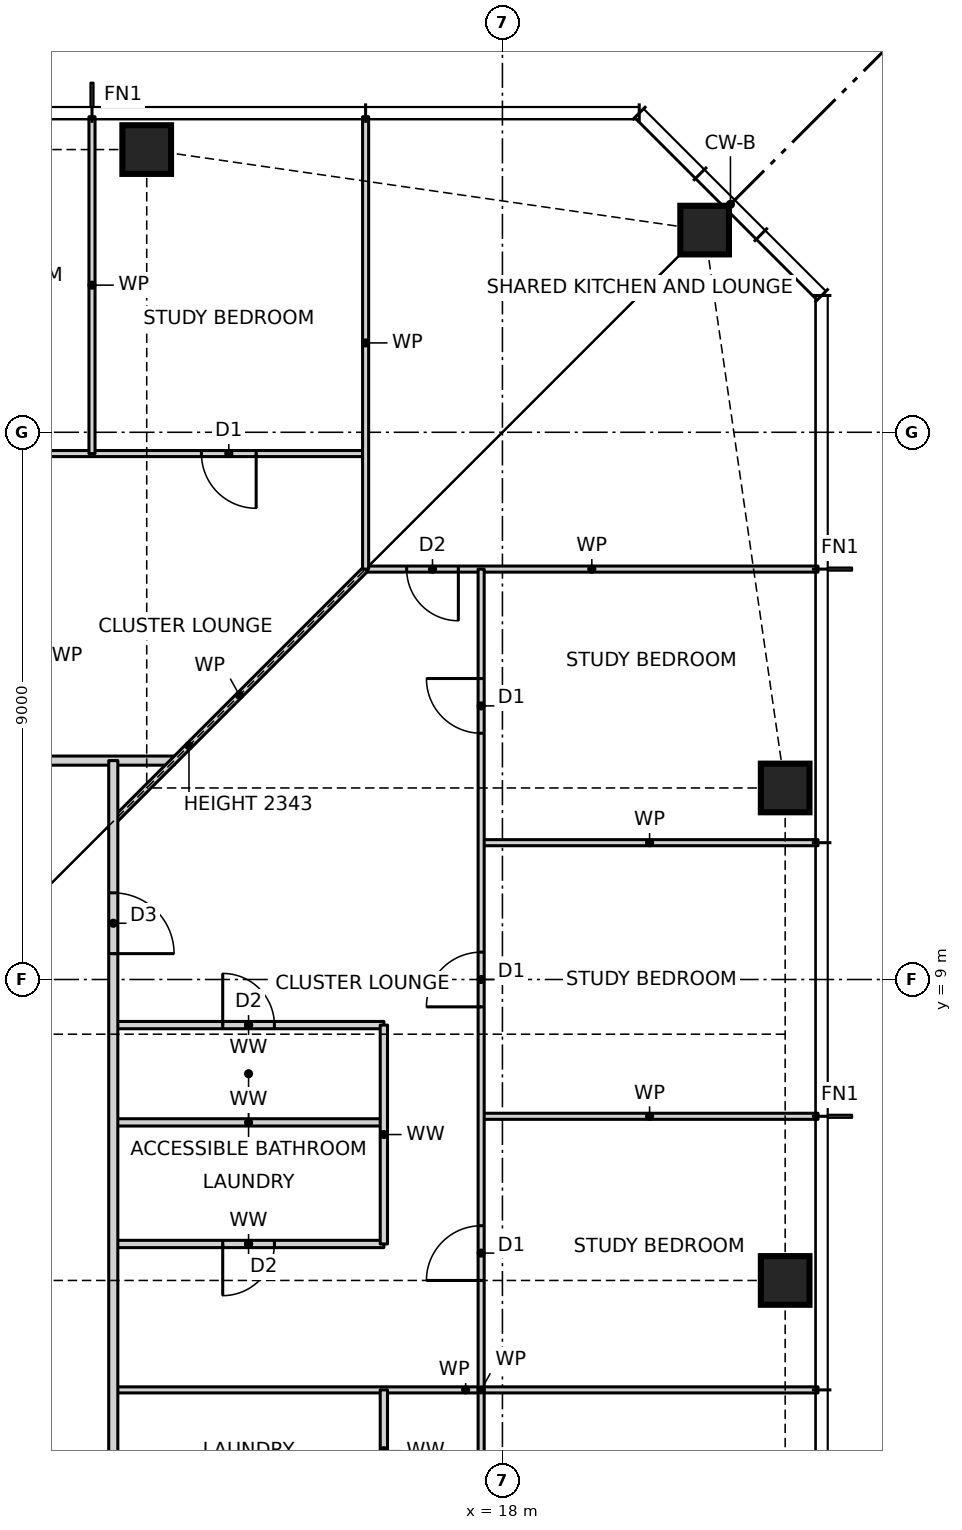
"""IFC4 building model, lengths in metres.
Left out: names, types, materials, properties, quantities, classifications, styles, units other than length and angle.
Written with IfcOpenShell. Run it as: python <this file> out.ifc"""

import sys

from ifc_helpers import new_model, si_unit, direction, frame, frame_2d, origin, origin_2d, place, context, subcontext, project, spatial, rectangle, hollow_rectangle, extrude, element, fill, save


model = new_model("IFC4")
c1 = context("Model", 3, precision=1e-05, world=origin(), true_north=direction((0.0, 1.0)))
c2 = subcontext(c1, "Body", "Model", "MODEL_VIEW")
j1 = project(units=[si_unit("LENGTHUNIT", "METRE"), si_unit("PLANEANGLEUNIT", "RADIAN")], contexts=[c1])
p1 = place(None, origin())
s1 = spatial("IfcSite", under=j1, at=p1, CompositionType="ELEMENT")
p2 = place(p1, origin())
s2 = spatial("IfcBuilding", under=s1, at=p2, CompositionType="ELEMENT")
p3 = place(p2, frame((0.0, 0.0, 36.0)))
s3 = spatial("IfcBuildingStorey", under=s2, at=p3, CompositionType="ELEMENT", Elevation=36.0)
for number, where, z_axis, x_axis in (
    (1, (22.65, 4.05, 0.0), (0.0, 0.0, 1.0), (1.0, 0.0, 0.0)),
    (2, (22.65, 12.15, 0.0), (0.0, 0.0, 1.0), (1.0, 0.0, 0.0)),
    (3, (21.326, 21.326, 0.0), (0.0, 0.0, 1.0), (1.0, 0.0, 0.0)),
    (4, (12.15, 22.65, 0.0), (0.0, 0.0, 1.0), (1.0, 0.0, 0.0)),
):
    element("IfcColumn", number, at=place(p3, frame(where, z_axis=z_axis, x_axis=x_axis)), inside=s3, PredefinedType="COLUMN", context=c2, shape_type="SweptSolid", body=[
        extrude(hollow_rectangle(XDim=0.8, YDim=0.8, WallThickness=0.09, at=origin_2d()), origin(), (0.0, 0.0, 1.0), 3.5),
    ])
p4 = place(p3, frame((11.6, 2.25, 0.0), z_axis=(0.0, 0.0, 1.0), x_axis=(1.0, 0.0, 0.0)))
e5 = element("IfcWall", 5, at=p4, inside=s3, PredefinedType="PARTITIONING", context=c2, shape_type="SweptSolid", body=[
    extrude(rectangle(XDim=11.59, YDim=0.1, at=frame_2d((5.795, 0.0))), origin(), (0.0, 0.0, 1.0), 3.27),
])
p5 = place(p3, frame((11.6, 4.65, 0.0), z_axis=(0.0, 0.0, 1.0), x_axis=(1.0, 0.0, 0.0)))
e6 = element("IfcWall", 6, at=p5, inside=s3, PredefinedType="PARTITIONING", context=c2, shape_type="SweptSolid", body=[
    extrude(rectangle(XDim=4.45, YDim=0.12, at=frame_2d((2.225, 0.0))), origin(), (0.0, 0.0, 1.0), 3.27),
])
p6 = place(p5, frame((1.8, 0.0, 0.0)))
e7 = element("IfcOpeningElement", 7, at=p6, cuts=e6, PredefinedType="OPENING", context=c2, shape_type="SweptSolid", body=[
    extrude(rectangle(XDim=0.85, YDim=2.1, at=frame_2d((0.425, 1.05))), frame((0.0, 0.07, 0.0), z_axis=(0.0, -1.0, 0.0), x_axis=(1.0, 0.0, 0.0)), (0.0, 0.0, 1.0), 0.14),
])
p7 = place(p3, frame((11.6, 6.65, 0.0), z_axis=(0.0, 0.0, 1.0), x_axis=(1.0, 0.0, 0.0)))
e8 = element("IfcWall", 8, at=p7, inside=s3, PredefinedType="PARTITIONING", context=c2, shape_type="SweptSolid", body=[
    extrude(rectangle(XDim=4.45, YDim=0.12, at=frame_2d((2.225, 0.0))), origin(), (0.0, 0.0, 1.0), 3.27),
])
p8 = place(p3, frame((17.65, 6.75, 0.0), z_axis=(0.0, 0.0, 1.0), x_axis=(1.0, 0.0, 0.0)))
e9 = element("IfcWall", 9, at=p8, inside=s3, PredefinedType="PARTITIONING", context=c2, shape_type="SweptSolid", body=[
    extrude(rectangle(XDim=5.54, YDim=0.1, at=frame_2d((2.77, 0.0))), origin(), (0.0, 0.0, 1.0), 3.27),
])
p9 = place(p3, frame((11.6, 8.25, 0.0), z_axis=(0.0, 0.0, 1.0), x_axis=(1.0, 0.0, 0.0)))
e10 = element("IfcWall", 10, at=p9, inside=s3, PredefinedType="PARTITIONING", context=c2, shape_type="SweptSolid", body=[
    extrude(rectangle(XDim=4.45, YDim=0.12, at=frame_2d((2.225, 0.0))), origin(), (0.0, 0.0, 1.0), 3.27),
])
p10 = place(p9, frame((1.8, 0.0, 0.0)))
e11 = element("IfcOpeningElement", 11, at=p10, cuts=e10, PredefinedType="OPENING", context=c2, shape_type="SweptSolid", body=[
    extrude(rectangle(XDim=0.85, YDim=2.1, at=frame_2d((0.425, 1.05))), frame((0.0, 0.07, 0.0), z_axis=(0.0, -1.0, 0.0), x_axis=(1.0, 0.0, 0.0)), (0.0, 0.0, 1.0), 0.14),
])
p11 = place(p3, frame((17.65, 11.25, 0.0), z_axis=(0.0, 0.0, 1.0), x_axis=(1.0, 0.0, 0.0)))
e12 = element("IfcWall", 12, at=p11, inside=s3, PredefinedType="PARTITIONING", context=c2, shape_type="SweptSolid", body=[
    extrude(rectangle(XDim=5.54, YDim=0.1, at=frame_2d((2.77, 0.0))), origin(), (0.0, 0.0, 1.0), 3.27),
])
p12 = place(p3, frame((-12.6, 12.6, 0.0), z_axis=(0.0, 0.0, 1.0), x_axis=(1.0, 0.0, 0.0)))
e13 = element("IfcWall", 13, at=p12, inside=s3, PredefinedType="PARTITIONING", context=c2, shape_type="SweptSolid", body=[
    extrude(rectangle(XDim=25.2, YDim=0.15, at=frame_2d((12.6, 0.0))), origin(), (0.0, 0.0, 1.0), 3.27),
])
p13 = place(p12, frame((3.15, 0.0, 0.0)))
e14 = element("IfcOpeningElement", 14, at=p13, cuts=e13, PredefinedType="OPENING", context=c2, shape_type="SweptSolid", body=[
    extrude(rectangle(XDim=1.0, YDim=2.1, at=frame_2d((0.5, 1.05))), frame((0.0, 0.085, 0.0), z_axis=(0.0, -1.0, 0.0), x_axis=(1.0, 0.0, 0.0)), (0.0, 0.0, 1.0), 0.17),
])
p14 = place(p3, frame((15.75, 15.75, 0.0), z_axis=(0.0, 0.0, 1.0), x_axis=(1.0, 0.0, 0.0)))
e15 = element("IfcWall", 15, at=p14, inside=s3, PredefinedType="PARTITIONING", context=c2, shape_type="SweptSolid", body=[
    extrude(rectangle(XDim=7.44, YDim=0.1, at=frame_2d((3.72, 0.0))), origin(), (0.0, 0.0, 1.0), 3.27),
])
p15 = place(p14, frame((0.675, 0.0, 0.0)))
e16 = element("IfcOpeningElement", 16, at=p15, cuts=e15, PredefinedType="OPENING", context=c2, shape_type="SweptSolid", body=[
    extrude(rectangle(XDim=0.85, YDim=2.1, at=frame_2d((0.425, 1.05))), frame((0.0, 0.06, 0.0), z_axis=(0.0, -1.0, 0.0), x_axis=(1.0, 0.0, 0.0)), (0.0, 0.0, 1.0), 0.12),
])
p16 = place(p3, frame((-15.75, 17.65, 0.0), z_axis=(0.0, 0.0, 1.0), x_axis=(1.0, 0.0, 0.0)))
e17 = element("IfcWall", 17, at=p16, inside=s3, PredefinedType="PARTITIONING", context=c2, shape_type="SweptSolid", body=[
    extrude(rectangle(XDim=31.5, YDim=0.1, at=frame_2d((15.75, 0.0))), origin(), (0.0, 0.0, 1.0), 3.27),
])
p17 = place(p16, frame((28.8, 0.0, 0.0)))
e18 = element("IfcOpeningElement", 18, at=p17, cuts=e17, PredefinedType="OPENING", context=c2, shape_type="SweptSolid", body=[
    extrude(rectangle(XDim=0.9, YDim=2.1, at=frame_2d((0.45, 1.05))), frame((0.0, 0.06, 0.0), z_axis=(0.0, -1.0, 0.0), x_axis=(1.0, 0.0, 0.0)), (0.0, 0.0, 1.0), 0.12),
])
p18 = place(p16, frame((24.3, 0.0, 0.0)))
e19 = element("IfcOpeningElement", 19, at=p18, cuts=e17, PredefinedType="OPENING", context=c2, shape_type="SweptSolid", body=[
    extrude(rectangle(XDim=0.9, YDim=2.1, at=frame_2d((0.45, 1.05))), frame((0.0, 0.06, 0.0), z_axis=(0.0, -1.0, 0.0), x_axis=(1.0, 0.0, 0.0)), (0.0, 0.0, 1.0), 0.12),
])
p19 = place(p16, frame((19.8, 0.0, 0.0)))
e20 = element("IfcOpeningElement", 20, at=p19, cuts=e17, PredefinedType="OPENING", context=c2, shape_type="SweptSolid", body=[
    extrude(rectangle(XDim=0.9, YDim=2.1, at=frame_2d((0.45, 1.05))), frame((0.0, 0.06, 0.0), z_axis=(0.0, -1.0, 0.0), x_axis=(1.0, 0.0, 0.0)), (0.0, 0.0, 1.0), 0.12),
])
p20 = place(p16, frame((15.3, 0.0, 0.0)))
e21 = element("IfcOpeningElement", 21, at=p20, cuts=e17, PredefinedType="OPENING", context=c2, shape_type="SweptSolid", body=[
    extrude(rectangle(XDim=0.9, YDim=2.1, at=frame_2d((0.45, 1.05))), frame((0.0, 0.06, 0.0), z_axis=(0.0, -1.0, 0.0), x_axis=(1.0, 0.0, 0.0)), (0.0, 0.0, 1.0), 0.12),
])
p21 = place(p16, frame((10.8, 0.0, 0.0)))
e22 = element("IfcOpeningElement", 22, at=p21, cuts=e17, PredefinedType="OPENING", context=c2, shape_type="SweptSolid", body=[
    extrude(rectangle(XDim=0.9, YDim=2.1, at=frame_2d((0.45, 1.05))), frame((0.0, 0.06, 0.0), z_axis=(0.0, -1.0, 0.0), x_axis=(1.0, 0.0, 0.0)), (0.0, 0.0, 1.0), 0.12),
])
p22 = place(p16, frame((6.3, 0.0, 0.0)))
e23 = element("IfcOpeningElement", 23, at=p22, cuts=e17, PredefinedType="OPENING", context=c2, shape_type="SweptSolid", body=[
    extrude(rectangle(XDim=0.9, YDim=2.1, at=frame_2d((0.45, 1.05))), frame((0.0, 0.06, 0.0), z_axis=(0.0, -1.0, 0.0), x_axis=(1.0, 0.0, 0.0)), (0.0, 0.0, 1.0), 0.12),
])
p23 = place(p16, frame((1.8, 0.0, 0.0)))
e24 = element("IfcOpeningElement", 24, at=p23, cuts=e17, PredefinedType="OPENING", context=c2, shape_type="SweptSolid", body=[
    extrude(rectangle(XDim=0.9, YDim=2.1, at=frame_2d((0.45, 1.05))), frame((0.0, 0.06, 0.0), z_axis=(0.0, -1.0, 0.0), x_axis=(1.0, 0.0, 0.0)), (0.0, 0.0, 1.0), 0.12),
])
p24 = place(p3, frame((11.6, 11.6, 0.0), z_axis=(0.0, 0.0, 1.0), x_axis=(0.707106781187, 0.707106781187, 0.0)))
e25 = element("IfcWall", 25, at=p24, inside=s3, PredefinedType="PARTITIONING", context=c2, shape_type="SweptSolid", body=[
    extrude(rectangle(XDim=5.869, YDim=0.1, at=frame_2d((2.935, 0.0))), origin(), (0.0, 0.0, 1.0), 2.343),
])
p25 = place(p3, frame((17.65, -11.25, 0.0), z_axis=(0.0, 0.0, 1.0), x_axis=(0.0, 1.0, 0.0)))
e26 = element("IfcWall", 26, at=p25, inside=s3, PredefinedType="PARTITIONING", context=c2, shape_type="SweptSolid", body=[
    extrude(rectangle(XDim=27.0, YDim=0.1, at=frame_2d((13.5, 0.0))), origin(), (0.0, 0.0, 1.0), 3.0),
])
p26 = place(p25, frame((1.8, 0.0, 0.0)))
e27 = element("IfcOpeningElement", 27, at=p26, cuts=e26, PredefinedType="OPENING", context=c2, shape_type="SweptSolid", body=[
    extrude(rectangle(XDim=0.9, YDim=2.1, at=frame_2d((0.45, 1.05))), frame((0.0, 0.06, 0.0), z_axis=(0.0, -1.0, 0.0), x_axis=(1.0, 0.0, 0.0)), (0.0, 0.0, 1.0), 0.12),
])
p27 = place(p25, frame((6.3, 0.0, 0.0)))
e28 = element("IfcOpeningElement", 28, at=p27, cuts=e26, PredefinedType="OPENING", context=c2, shape_type="SweptSolid", body=[
    extrude(rectangle(XDim=0.9, YDim=2.1, at=frame_2d((0.45, 1.05))), frame((0.0, 0.06, 0.0), z_axis=(0.0, -1.0, 0.0), x_axis=(1.0, 0.0, 0.0)), (0.0, 0.0, 1.0), 0.12),
])
p28 = place(p25, frame((10.8, 0.0, 0.0)))
e29 = element("IfcOpeningElement", 29, at=p28, cuts=e26, PredefinedType="OPENING", context=c2, shape_type="SweptSolid", body=[
    extrude(rectangle(XDim=0.9, YDim=2.1, at=frame_2d((0.45, 1.05))), frame((0.0, 0.06, 0.0), z_axis=(0.0, -1.0, 0.0), x_axis=(1.0, 0.0, 0.0)), (0.0, 0.0, 1.0), 0.12),
])
p29 = place(p25, frame((15.3, 0.0, 0.0)))
e30 = element("IfcOpeningElement", 30, at=p29, cuts=e26, PredefinedType="OPENING", context=c2, shape_type="SweptSolid", body=[
    extrude(rectangle(XDim=0.9, YDim=2.1, at=frame_2d((0.45, 1.05))), frame((0.0, 0.06, 0.0), z_axis=(0.0, -1.0, 0.0), x_axis=(1.0, 0.0, 0.0)), (0.0, 0.0, 1.0), 0.12),
])
p30 = place(p25, frame((19.8, 0.0, 0.0)))
e31 = element("IfcOpeningElement", 31, at=p30, cuts=e26, PredefinedType="OPENING", context=c2, shape_type="SweptSolid", body=[
    extrude(rectangle(XDim=0.9, YDim=2.1, at=frame_2d((0.45, 1.05))), frame((0.0, 0.06, 0.0), z_axis=(0.0, -1.0, 0.0), x_axis=(1.0, 0.0, 0.0)), (0.0, 0.0, 1.0), 0.12),
])
p31 = place(p25, frame((24.3, 0.0, 0.0)))
e32 = element("IfcOpeningElement", 32, at=p31, cuts=e26, PredefinedType="OPENING", context=c2, shape_type="SweptSolid", body=[
    extrude(rectangle(XDim=0.9, YDim=2.1, at=frame_2d((0.45, 1.05))), frame((0.0, 0.06, 0.0), z_axis=(0.0, -1.0, 0.0), x_axis=(1.0, 0.0, 0.0)), (0.0, 0.0, 1.0), 0.12),
])
p32 = place(p3, frame((16.05, 0.25, 0.0), z_axis=(0.0, 0.0, 1.0), x_axis=(0.0, 1.0, 0.0)))
e33 = element("IfcWall", 33, at=p32, inside=s3, PredefinedType="PARTITIONING", context=c2, shape_type="SweptSolid", body=[
    extrude(rectangle(XDim=2.0, YDim=0.12, at=frame_2d((1.0, 0.0))), origin(), (0.0, 0.0, 1.0), 3.27),
])
p33 = place(p3, frame((16.05, 4.65, 0.0), z_axis=(0.0, 0.0, 1.0), x_axis=(0.0, 1.0, 0.0)))
e34 = element("IfcWall", 34, at=p33, inside=s3, PredefinedType="PARTITIONING", context=c2, shape_type="SweptSolid", body=[
    extrude(rectangle(XDim=3.6, YDim=0.12, at=frame_2d((1.8, 0.0))), origin(), (0.0, 0.0, 1.0), 3.27),
])
p34 = place(p3, frame((15.75, 15.75, 0.0), z_axis=(0.0, 0.0, 1.0), x_axis=(0.0, 1.0, 0.0)))
e35 = element("IfcWall", 35, at=p34, inside=s3, PredefinedType="PARTITIONING", context=c2, shape_type="SweptSolid", body=[
    extrude(rectangle(XDim=7.44, YDim=0.1, at=frame_2d((3.72, 0.0))), origin(), (0.0, 0.0, 1.0), 3.27),
])
p35 = place(p3, frame((11.6, -11.6, 0.0), z_axis=(0.0, 0.0, 1.0), x_axis=(0.0, 1.0, 0.0)))
e36 = element("IfcWall", 36, at=p35, inside=s3, PredefinedType="PARTITIONING", context=c2, shape_type="SweptSolid", body=[
    extrude(rectangle(XDim=24.2, YDim=0.15, at=frame_2d((12.1, 0.0))), origin(), (0.0, 0.0, 1.0), 3.27),
])
p36 = place(p35, frame((3.6, 0.0, 0.0)))
e37 = element("IfcOpeningElement", 37, at=p36, cuts=e36, PredefinedType="OPENING", context=c2, shape_type="SweptSolid", body=[
    extrude(rectangle(XDim=1.0, YDim=2.1, at=frame_2d((0.5, 1.05))), frame((0.0, 0.085, 0.0), z_axis=(0.0, -1.0, 0.0), x_axis=(1.0, 0.0, 0.0)), (0.0, 0.0, 1.0), 0.17),
])
p37 = place(p35, frame((21.025, 0.0, 0.0)))
e38 = element("IfcOpeningElement", 38, at=p37, cuts=e36, PredefinedType="OPENING", context=c2, shape_type="SweptSolid", body=[
    extrude(rectangle(XDim=1.0, YDim=2.1, at=frame_2d((0.5, 1.05))), frame((0.0, 0.085, 0.0), z_axis=(0.0, -1.0, 0.0), x_axis=(1.0, 0.0, 0.0)), (0.0, 0.0, 1.0), 0.17),
])
p38 = place(p3, frame((11.25, 17.65, 0.0), z_axis=(0.0, 0.0, 1.0), x_axis=(0.0, 1.0, 0.0)))
e39 = element("IfcWall", 39, at=p38, inside=s3, PredefinedType="PARTITIONING", context=c2, shape_type="SweptSolid", body=[
    extrude(rectangle(XDim=5.54, YDim=0.1, at=frame_2d((2.77, 0.0))), origin(), (0.0, 0.0, 1.0), 3.27),
])
p39 = place(p29, origin())
e40 = element("IfcDoor", 40, at=p39, inside=s3, OperationType="SINGLE_SWING_LEFT", PredefinedType="DOOR", context=c2, shape_type="SweptSolid", body=[
    extrude(rectangle(XDim=0.9, YDim=2.1, at=frame_2d((0.45, 1.05))), frame((0.0, 0.025, 0.0), z_axis=(0.0, -1.0, 0.0), x_axis=(1.0, 0.0, 0.0)), (0.0, 0.0, 1.0), 0.05),
])
fill(e30, e40)
p40 = place(p30, origin())
e41 = element("IfcDoor", 41, at=p40, inside=s3, OperationType="SINGLE_SWING_LEFT", PredefinedType="DOOR", context=c2, shape_type="SweptSolid", body=[
    extrude(rectangle(XDim=0.9, YDim=2.1, at=frame_2d((0.45, 1.05))), frame((0.0, 0.025, 0.0), z_axis=(0.0, -1.0, 0.0), x_axis=(1.0, 0.0, 0.0)), (0.0, 0.0, 1.0), 0.05),
])
fill(e31, e41)
p41 = place(p31, origin())
e42 = element("IfcDoor", 42, at=p41, inside=s3, OperationType="SINGLE_SWING_RIGHT", PredefinedType="DOOR", context=c2, shape_type="SweptSolid", body=[
    extrude(rectangle(XDim=0.9, YDim=2.1, at=frame_2d((0.45, 1.05))), frame((0.0, 0.025, 0.0), z_axis=(0.0, -1.0, 0.0), x_axis=(1.0, 0.0, 0.0)), (0.0, 0.0, 1.0), 0.05),
])
fill(e32, e42)
p42 = place(p37, frame((1.0, 0.0, 0.0), z_axis=(0.0, 0.0, 1.0), x_axis=(-1.0, 0.0, 0.0)))
e43 = element("IfcDoor", 43, at=p42, inside=s3, OperationType="SINGLE_SWING_RIGHT", PredefinedType="DOOR", context=c2, shape_type="SweptSolid", body=[
    extrude(rectangle(XDim=1.0, YDim=2.1, at=frame_2d((0.5, 1.05))), frame((0.0, 0.025, 0.0), z_axis=(0.0, -1.0, 0.0), x_axis=(1.0, 0.0, 0.0)), (0.0, 0.0, 1.0), 0.05),
])
fill(e38, e43)
p43 = place(p6, frame((0.85, 0.0, 0.0), z_axis=(0.0, 0.0, 1.0), x_axis=(-1.0, 0.0, 0.0)))
e44 = element("IfcDoor", 44, at=p43, inside=s3, OperationType="SINGLE_SWING_RIGHT", PredefinedType="DOOR", context=c2, shape_type="SweptSolid", body=[
    extrude(rectangle(XDim=0.85, YDim=2.1, at=frame_2d((0.425, 1.05))), frame((0.0, 0.025, 0.0), z_axis=(0.0, -1.0, 0.0), x_axis=(1.0, 0.0, 0.0)), (0.0, 0.0, 1.0), 0.05),
])
fill(e7, e44)
p44 = place(p10, origin())
e45 = element("IfcDoor", 45, at=p44, inside=s3, OperationType="SINGLE_SWING_LEFT", PredefinedType="DOOR", context=c2, shape_type="SweptSolid", body=[
    extrude(rectangle(XDim=0.85, YDim=2.1, at=frame_2d((0.425, 1.05))), frame((0.0, 0.025, 0.0), z_axis=(0.0, -1.0, 0.0), x_axis=(1.0, 0.0, 0.0)), (0.0, 0.0, 1.0), 0.05),
])
fill(e11, e45)
p45 = place(p17, frame((0.9, 0.0, 0.0), z_axis=(0.0, 0.0, 1.0), x_axis=(-1.0, 0.0, 0.0)))
e46 = element("IfcDoor", 46, at=p45, inside=s3, OperationType="SINGLE_SWING_LEFT", PredefinedType="DOOR", context=c2, shape_type="SweptSolid", body=[
    extrude(rectangle(XDim=0.9, YDim=2.1, at=frame_2d((0.45, 1.05))), frame((0.0, 0.025, 0.0), z_axis=(0.0, -1.0, 0.0), x_axis=(1.0, 0.0, 0.0)), (0.0, 0.0, 1.0), 0.05),
])
fill(e18, e46)
p46 = place(p15, frame((0.85, 0.0, 0.0), z_axis=(0.0, 0.0, 1.0), x_axis=(-1.0, 0.0, 0.0)))
e47 = element("IfcDoor", 47, at=p46, inside=s3, OperationType="SINGLE_SWING_LEFT", PredefinedType="DOOR", context=c2, shape_type="SweptSolid", body=[
    extrude(rectangle(XDim=0.85, YDim=2.1, at=frame_2d((0.425, 1.05))), frame((0.0, 0.025, 0.0), z_axis=(0.0, -1.0, 0.0), x_axis=(1.0, 0.0, 0.0)), (0.0, 0.0, 1.0), 0.05),
])
fill(e16, e47)
save(model, sys.argv[1])
